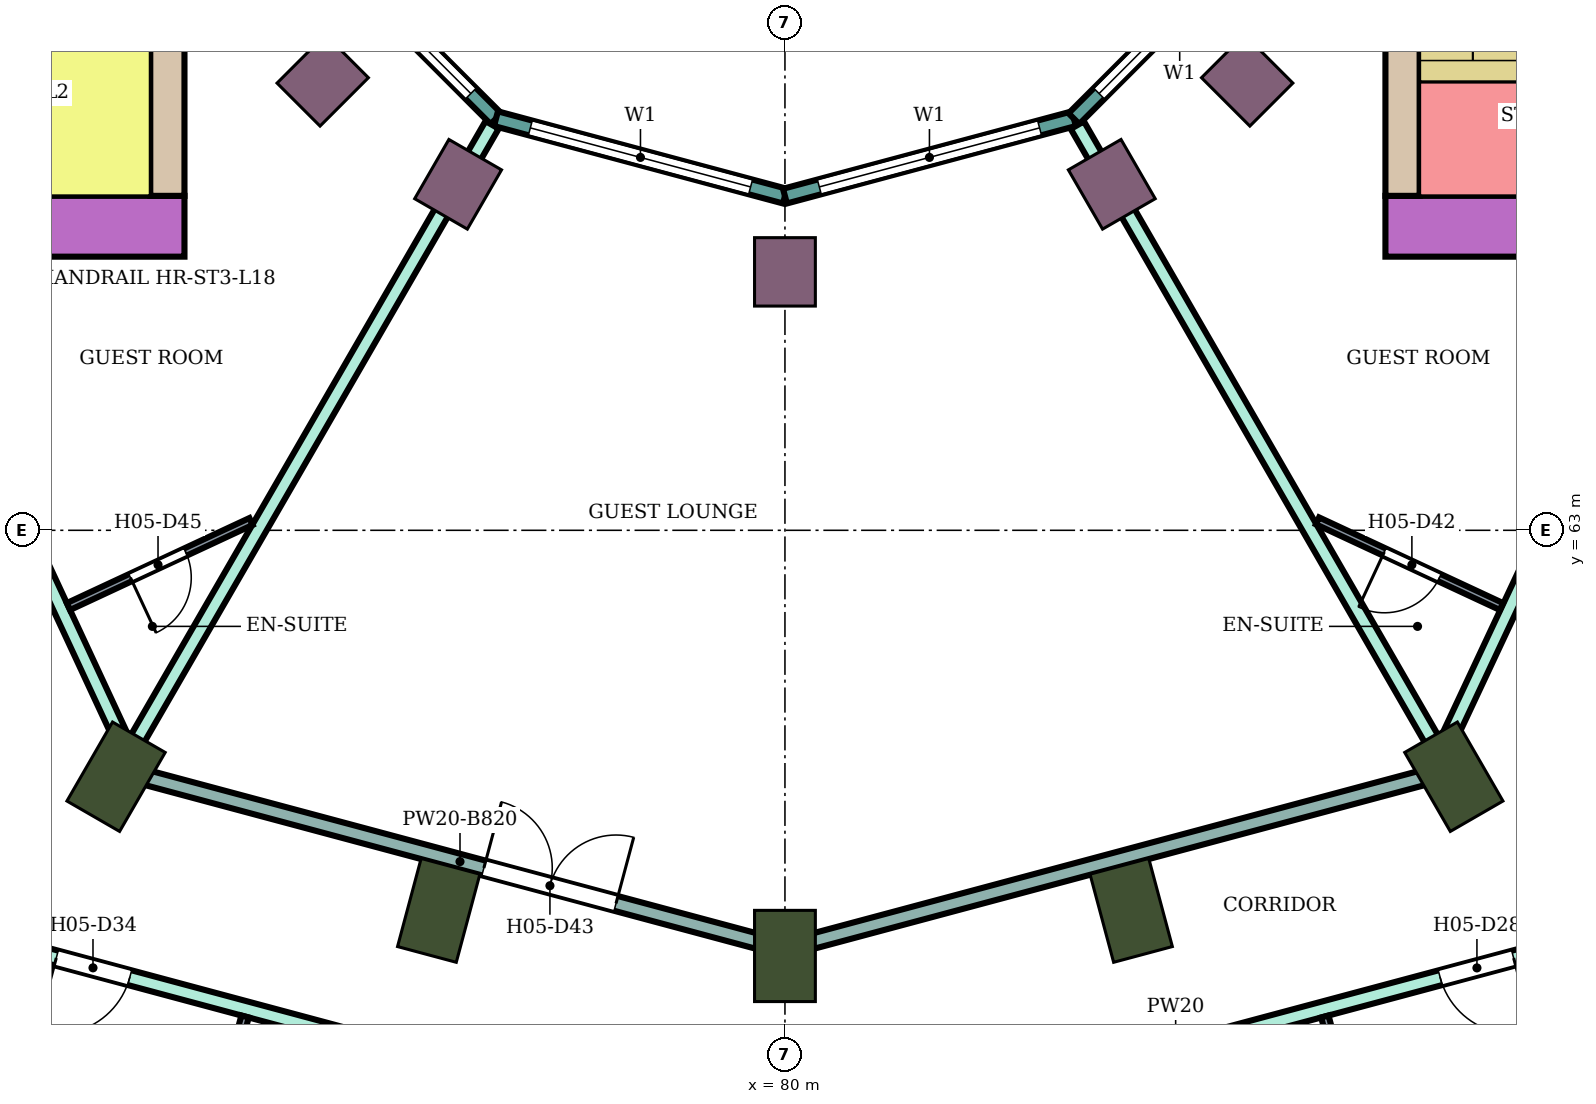
"""IFC4 building model, lengths in metres.
Left out: names, types, materials, properties, quantities, classifications, styles, units other than length and angle.
Written with IfcOpenShell. Run it as: python <this file> out.ifc"""

import sys

from ifc_helpers import new_model, si_unit, direction, frame, frame_2d, origin, origin_2d, place, context, subcontext, project, spatial, rectangle, extrude, element, fill, save


model = new_model("IFC4")
c1 = context("Model", 3, precision=1e-05, world=origin(), true_north=direction((0.0, 1.0)))
c2 = subcontext(c1, "Body", "Model", "MODEL_VIEW")
j1 = project(units=[si_unit("LENGTHUNIT", "METRE"), si_unit("PLANEANGLEUNIT", "RADIAN")], contexts=[c1])
p1 = place(None, origin())
s1 = spatial("IfcSite", under=j1, at=p1, CompositionType="ELEMENT")
p2 = place(p1, origin())
s2 = spatial("IfcBuilding", under=s1, at=p2, CompositionType="ELEMENT")
p3 = place(p2, frame((0.0, 0.0, 82.4)))
s3 = spatial("IfcBuildingStorey", under=s2, at=p3, CompositionType="ELEMENT", Elevation=82.4)
for number, where, z_axis, x_axis in (
    (1, (71.2, 59.758, 0.0), (0.0, 0.0, 1.0), (-0.5, -0.866, 0.0)),
    (2, (75.445, 58.0, 0.0), (0.0, 0.0, 1.0), (-0.259, -0.966, 0.0)),
    (3, (80.0, 57.4, 0.0), (0.0, 0.0, 1.0), (0.0, -1.0, 0.0)),
    (4, (84.555, 58.0, 0.0), (0.0, 0.0, 1.0), (0.259, -0.966, 0.0)),
    (5, (88.8, 59.758, 0.0), (0.0, 0.0, 1.0), (0.5, -0.866, 0.0)),
):
    element("IfcColumn", number, at=place(p3, frame(where, z_axis=z_axis, x_axis=x_axis)), inside=s3, PredefinedType="COLUMN", context=c2, shape_type="SweptSolid", body=[
        extrude(rectangle(XDim=1.2, YDim=0.8, at=origin_2d()), origin(), (0.0, 0.0, 1.0), 3.8),
    ])
for number, where, z_axis, x_axis in (
    (6, (73.919, 68.919, 0.0), (0.0, 0.0, 1.0), (-0.707, -0.707, 0.0)),
    (7, (75.7, 67.552, 0.0), (0.0, 0.0, 1.0), (-0.5, -0.866, 0.0)),
    (8, (80.0, 66.4, 0.0), (0.0, 0.0, 1.0), (0.0, -1.0, 0.0)),
    (9, (84.3, 67.552, 0.0), (0.0, 0.0, 1.0), (0.5, -0.866, 0.0)),
    (10, (86.081, 68.919, 0.0), (0.0, 0.0, 1.0), (0.707, -0.707, 0.0)),
):
    element("IfcColumn", number, at=place(p3, frame(where, z_axis=z_axis, x_axis=x_axis)), inside=s3, PredefinedType="COLUMN", context=c2, shape_type="SweptSolid", body=[
        extrude(rectangle(XDim=0.9, YDim=0.8, at=origin_2d()), origin(), (0.0, 0.0, 1.0), 3.8),
    ])
p4 = place(p3, frame((87.9, 67.0, 0.0), z_axis=(0.0, 0.0, 1.0), x_axis=(1.0, 0.0, 0.0)))
e11 = element("IfcWall", 11, at=p4, inside=s3, PredefinedType="SHEAR", context=c2, shape_type="SweptSolid", body=[
    extrude(rectangle(XDim=14.7, YDim=0.8, at=frame_2d((7.35, 0.0))), origin(), (0.0, 0.0, 1.0), 3.48),
])
p5 = place(p4, frame((4.2, 0.0, 0.0)))
e12 = element("IfcOpeningElement", 12, at=p5, cuts=e11, PredefinedType="OPENING", context=c2, shape_type="SweptSolid", body=[
    extrude(rectangle(XDim=2.4, YDim=2.4, at=frame_2d((1.2, 1.2))), frame((0.0, 0.41, 0.0), z_axis=(0.0, -1.0, 0.0), x_axis=(1.0, 0.0, 0.0)), (0.0, 0.0, 1.0), 0.82),
])
p6 = place(p3, frame((88.125, 67.4, 0.0), z_axis=(0.0, 0.0, 1.0), x_axis=(0.0, 1.0, 0.0)))
e13 = element("IfcWall", 13, at=p6, inside=s3, PredefinedType="SHEAR", context=c2, shape_type="SweptSolid", body=[
    extrude(rectangle(XDim=7.6, YDim=0.45, at=frame_2d((3.8, 0.0))), origin(), (0.0, 0.0, 1.0), 3.48),
])
p7 = place(p3, frame((72.1, 67.0, 0.0), z_axis=(0.0, 0.0, 1.0), x_axis=(-1.0, 0.0, 0.0)))
e14 = element("IfcWall", 14, at=p7, inside=s3, PredefinedType="SHEAR", context=c2, shape_type="SweptSolid", body=[
    extrude(rectangle(XDim=14.7, YDim=0.8, at=frame_2d((7.35, 0.0))), origin(), (0.0, 0.0, 1.0), 3.48),
])
p8 = place(p7, frame((4.2, 0.0, 0.0)))
e15 = element("IfcOpeningElement", 15, at=p8, cuts=e14, PredefinedType="OPENING", context=c2, shape_type="SweptSolid", body=[
    extrude(rectangle(XDim=2.4, YDim=2.4, at=frame_2d((1.2, 1.2))), frame((0.0, 0.41, 0.0), z_axis=(0.0, -1.0, 0.0), x_axis=(1.0, 0.0, 0.0)), (0.0, 0.0, 1.0), 0.82),
])
p9 = place(p3, frame((71.875, 75.0, 0.0), z_axis=(0.0, 0.0, 1.0), x_axis=(0.0, -1.0, 0.0)))
e16 = element("IfcWall", 16, at=p9, inside=s3, PredefinedType="SHEAR", context=c2, shape_type="SweptSolid", body=[
    extrude(rectangle(XDim=7.6, YDim=0.45, at=frame_2d((3.8, 0.0))), origin(), (0.0, 0.0, 1.0), 3.48),
])
p10 = place(p3, frame((73.415, 71.198, 0.0), z_axis=(0.0, 0.0, 1.0), x_axis=(0.707106781187, -0.707106781187, 0.0)))
e17 = element("IfcWall", 17, at=p10, inside=s3, PredefinedType="NOTDEFINED", context=c2, shape_type="SweptSolid", body=[
    extrude(rectangle(XDim=3.936, YDim=0.2, at=frame_2d((1.968, 0.0))), origin(), (0.0, 0.0, 1.0), 3.8),
])
p11 = place(p10, frame((0.468, 0.0, 0.9)))
e18 = element("IfcOpeningElement", 18, at=p11, cuts=e17, PredefinedType="OPENING", context=c2, shape_type="SweptSolid", body=[
    extrude(rectangle(XDim=3.0, YDim=2.3, at=frame_2d((1.5, 1.15))), frame((0.0, 0.11, 0.0), z_axis=(0.0, -1.0, 0.0), x_axis=(1.0, 0.0, 0.0)), (0.0, 0.0, 1.0), 0.22),
])
p12 = place(p3, frame((76.198, 68.415, 0.0), z_axis=(0.0, 0.0, 1.0), x_axis=(0.965933654434, -0.258789828301, 0.0)))
e19 = element("IfcWall", 19, at=p12, inside=s3, PredefinedType="NOTDEFINED", context=c2, shape_type="SweptSolid", body=[
    extrude(rectangle(XDim=3.936, YDim=0.2, at=frame_2d((1.968, 0.0))), origin(), (0.0, 0.0, 1.0), 3.8),
])
p13 = place(p12, frame((0.468, 0.0, 0.9)))
e20 = element("IfcOpeningElement", 20, at=p13, cuts=e19, PredefinedType="OPENING", context=c2, shape_type="SweptSolid", body=[
    extrude(rectangle(XDim=3.0, YDim=2.3, at=frame_2d((1.5, 1.15))), frame((0.0, 0.11, 0.0), z_axis=(0.0, -1.0, 0.0), x_axis=(1.0, 0.0, 0.0)), (0.0, 0.0, 1.0), 0.22),
])
p14 = place(p3, frame((80.0, 67.396, 0.0), z_axis=(0.0, 0.0, 1.0), x_axis=(0.965933654434, 0.258789828301, 0.0)))
e21 = element("IfcWall", 21, at=p14, inside=s3, PredefinedType="NOTDEFINED", context=c2, shape_type="SweptSolid", body=[
    extrude(rectangle(XDim=3.936, YDim=0.2, at=frame_2d((1.968, 0.0))), origin(), (0.0, 0.0, 1.0), 3.8),
])
p15 = place(p14, frame((0.468, 0.0, 0.9)))
e22 = element("IfcOpeningElement", 22, at=p15, cuts=e21, PredefinedType="OPENING", context=c2, shape_type="SweptSolid", body=[
    extrude(rectangle(XDim=3.0, YDim=2.3, at=frame_2d((1.5, 1.15))), frame((0.0, 0.11, 0.0), z_axis=(0.0, -1.0, 0.0), x_axis=(1.0, 0.0, 0.0)), (0.0, 0.0, 1.0), 0.22),
])
p16 = place(p3, frame((83.802, 68.415, 0.0), z_axis=(0.0, 0.0, 1.0), x_axis=(0.707106781187, 0.707106781187, 0.0)))
e23 = element("IfcWall", 23, at=p16, inside=s3, PredefinedType="NOTDEFINED", context=c2, shape_type="SweptSolid", body=[
    extrude(rectangle(XDim=3.936, YDim=0.2, at=frame_2d((1.968, 0.0))), origin(), (0.0, 0.0, 1.0), 3.8),
])
p17 = place(p16, frame((0.468, 0.0, 0.9)))
e24 = element("IfcOpeningElement", 24, at=p17, cuts=e23, PredefinedType="OPENING", context=c2, shape_type="SweptSolid", body=[
    extrude(rectangle(XDim=3.0, YDim=2.3, at=frame_2d((1.5, 1.15))), frame((0.0, 0.11, 0.0), z_axis=(0.0, -1.0, 0.0), x_axis=(1.0, 0.0, 0.0)), (0.0, 0.0, 1.0), 0.22),
])
p18 = place(p3, frame((68.321, 66.6, 0.0), z_axis=(0.0, 0.0, 1.0), x_axis=(0.421914092414, -0.906635813666, 0.0)))
e25 = element("IfcWall", 25, at=p18, inside=s3, PredefinedType="PARTITIONING", context=c2, shape_type="SweptSolid", body=[
    extrude(rectangle(XDim=7.459, YDim=0.2, at=frame_2d((3.73, 0.0))), origin(), (0.0, 0.0, 1.0), 3.35),
])
p19 = place(p18, frame((0.7, 0.0, 0.0)))
e26 = element("IfcOpeningElement", 26, at=p19, cuts=e25, PredefinedType="OPENING", context=c2, shape_type="SweptSolid", body=[
    extrude(rectangle(XDim=1.0, YDim=2.1, at=frame_2d((0.5, 1.05))), frame((0.0, 0.11, 0.0), z_axis=(0.0, -1.0, 0.0), x_axis=(1.0, 0.0, 0.0)), (0.0, 0.0, 1.0), 0.22),
])
p20 = place(p3, frame((69.652, 57.578, 0.0), z_axis=(0.0, 0.0, 1.0), x_axis=(0.965857425723, -0.259074184695, 0.0)))
e27 = element("IfcWall", 27, at=p20, inside=s3, PredefinedType="PARTITIONING", context=c2, shape_type="SweptSolid", body=[
    extrude(rectangle(XDim=10.623, YDim=0.2, at=frame_2d((5.312, 0.0))), origin(), (0.0, 0.0, 1.0), 3.35),
])
p21 = place(p20, frame((9.163, 0.0, 0.0)))
e28 = element("IfcOpeningElement", 28, at=p21, cuts=e27, PredefinedType="OPENING", context=c2, shape_type="SweptSolid", body=[
    extrude(rectangle(XDim=1.0, YDim=2.1, at=frame_2d((0.5, 1.05))), frame((0.0, 0.11, 0.0), z_axis=(0.0, -1.0, 0.0), x_axis=(1.0, 0.0, 0.0)), (0.0, 0.0, 1.0), 0.22),
])
p22 = place(p20, frame((0.788, 0.0, 0.0)))
e29 = element("IfcOpeningElement", 29, at=p22, cuts=e27, PredefinedType="OPENING", context=c2, shape_type="SweptSolid", body=[
    extrude(rectangle(XDim=1.0, YDim=2.1, at=frame_2d((0.5, 1.05))), frame((0.0, 0.11, 0.0), z_axis=(0.0, -1.0, 0.0), x_axis=(1.0, 0.0, 0.0)), (0.0, 0.0, 1.0), 0.22),
])
p23 = place(p3, frame((71.459, 60.218, 0.0), z_axis=(0.0, 0.0, 1.0), x_axis=(0.500232027118, 0.865891401416, 0.0)))
e30 = element("IfcWall", 30, at=p23, inside=s3, PredefinedType="PARTITIONING", context=c2, shape_type="SweptSolid", body=[
    extrude(rectangle(XDim=9.372, YDim=0.2, at=frame_2d((4.686, 0.0))), origin(), (0.0, 0.0, 1.0), 3.35),
])
p24 = place(p3, frame((71.498, 59.774, 0.0), z_axis=(0.0, 0.0, 1.0), x_axis=(0.965911938046, -0.258870871168, 0.0)))
e31 = element("IfcWall", 31, at=p24, inside=s3, PredefinedType="PARTITIONING", context=c2, shape_type="SweptSolid", body=[
    extrude(rectangle(XDim=8.752, YDim=0.2, at=frame_2d((4.376, 0.0))), origin(), (0.0, 0.0, 1.0), 2.98),
])
p25 = place(p24, frame((4.701, 0.0, 0.0)))
e32 = element("IfcOpeningElement", 32, at=p25, cuts=e31, PredefinedType="OPENING", context=c2, shape_type="SweptSolid", body=[
    extrude(rectangle(XDim=1.8, YDim=2.1, at=frame_2d((0.9, 1.05))), frame((0.0, 0.11, 0.0), z_axis=(0.0, -1.0, 0.0), x_axis=(1.0, 0.0, 0.0)), (0.0, 0.0, 1.0), 0.22),
])
p26 = place(p3, frame((80.0, 54.805, 0.0), z_axis=(0.0, 0.0, 1.0), x_axis=(0.965962177934, 0.258683340788, 0.0)))
e33 = element("IfcWall", 33, at=p26, inside=s3, PredefinedType="PARTITIONING", context=c2, shape_type="SweptSolid", body=[
    extrude(rectangle(XDim=10.643, YDim=0.2, at=frame_2d((5.322, 0.0))), origin(), (0.0, 0.0, 1.0), 3.35),
])
p27 = place(p26, frame((8.925, 0.0, 0.0)))
e34 = element("IfcOpeningElement", 34, at=p27, cuts=e33, PredefinedType="OPENING", context=c2, shape_type="SweptSolid", body=[
    extrude(rectangle(XDim=1.0, YDim=2.1, at=frame_2d((0.5, 1.05))), frame((0.0, 0.11, 0.0), z_axis=(0.0, -1.0, 0.0), x_axis=(1.0, 0.0, 0.0)), (0.0, 0.0, 1.0), 0.22),
])
p28 = place(p26, frame((0.55, 0.0, 0.0)))
e35 = element("IfcOpeningElement", 35, at=p28, cuts=e33, PredefinedType="OPENING", context=c2, shape_type="SweptSolid", body=[
    extrude(rectangle(XDim=1.0, YDim=2.1, at=frame_2d((0.5, 1.05))), frame((0.0, 0.11, 0.0), z_axis=(0.0, -1.0, 0.0), x_axis=(1.0, 0.0, 0.0)), (0.0, 0.0, 1.0), 0.22),
])
p29 = place(p3, frame((80.0, 57.496, 0.0), z_axis=(0.0, 0.0, 1.0), x_axis=(0.96592471314, 0.258823199396, 0.0)))
e36 = element("IfcWall", 36, at=p29, inside=s3, PredefinedType="PARTITIONING", context=c2, shape_type="SweptSolid", body=[
    extrude(rectangle(XDim=8.732, YDim=0.2, at=frame_2d((4.366, 0.0))), origin(), (0.0, 0.0, 1.0), 2.98),
])
p30 = place(p3, frame((83.846, 68.33, 0.0), z_axis=(0.0, 0.0, 1.0), x_axis=(0.499822319857, -0.866127963163, 0.0)))
e37 = element("IfcWall", 37, at=p30, inside=s3, PredefinedType="PARTITIONING", context=c2, shape_type="SweptSolid", body=[
    extrude(rectangle(XDim=9.382, YDim=0.2, at=frame_2d((4.691, 0.0))), origin(), (0.0, 0.0, 1.0), 3.35),
])
p31 = place(p3, frame((88.501, 59.775, 0.0), z_axis=(0.0, 0.0, 1.0), x_axis=(0.424700525505, 0.905333896215, 0.0)))
e38 = element("IfcWall", 38, at=p31, inside=s3, PredefinedType="PARTITIONING", context=c2, shape_type="SweptSolid", body=[
    extrude(rectangle(XDim=7.53, YDim=0.2, at=frame_2d((3.765, 0.0))), origin(), (0.0, 0.0, 1.0), 3.35),
])
p32 = place(p31, frame((5.83, 0.0, 0.0)))
e39 = element("IfcOpeningElement", 39, at=p32, cuts=e38, PredefinedType="OPENING", context=c2, shape_type="SweptSolid", body=[
    extrude(rectangle(XDim=1.0, YDim=2.1, at=frame_2d((0.5, 1.05))), frame((0.0, 0.11, 0.0), z_axis=(0.0, -1.0, 0.0), x_axis=(1.0, 0.0, 0.0)), (0.0, 0.0, 1.0), 0.22),
])
p33 = place(p3, frame((70.574, 61.997, 0.0), z_axis=(0.0, 0.0, 1.0), x_axis=(0.906503026865, 0.422199315826, 0.0)))
e40 = element("IfcWall", 40, at=p33, inside=s3, PredefinedType="PARTITIONING", context=c2, shape_type="SweptSolid", body=[
    extrude(rectangle(XDim=2.65, YDim=0.1, at=frame_2d((1.325, 0.0))), origin(), (0.0, 0.0, 1.0), 3.35),
])
p34 = place(p33, frame((0.9, 0.0, 0.0)))
e41 = element("IfcOpeningElement", 41, at=p34, cuts=e40, PredefinedType="OPENING", context=c2, shape_type="SweptSolid", body=[
    extrude(rectangle(XDim=0.8, YDim=2.1, at=frame_2d((0.4, 1.05))), frame((0.0, 0.06, 0.0), z_axis=(0.0, -1.0, 0.0), x_axis=(1.0, 0.0, 0.0)), (0.0, 0.0, 1.0), 0.12),
])
p35 = place(p3, frame((72.211, 54.044, 0.0), z_axis=(0.0, 0.0, 1.0), x_axis=(0.258866552082, 0.96591309558, 0.0)))
e42 = element("IfcWall", 42, at=p35, inside=s3, PredefinedType="PARTITIONING", context=c2, shape_type="SweptSolid", body=[
    extrude(rectangle(XDim=2.65, YDim=0.1, at=frame_2d((1.325, 0.0))), origin(), (0.0, 0.0, 1.0), 3.35),
])
p36 = place(p35, frame((0.95, 0.0, 0.0)))
e43 = element("IfcOpeningElement", 43, at=p36, cuts=e42, PredefinedType="OPENING", context=c2, shape_type="SweptSolid", body=[
    extrude(rectangle(XDim=0.8, YDim=2.1, at=frame_2d((0.4, 1.05))), frame((0.0, 0.06, 0.0), z_axis=(0.0, -1.0, 0.0), x_axis=(1.0, 0.0, 0.0)), (0.0, 0.0, 1.0), 0.12),
])
p37 = place(p3, frame((87.006, 63.124, 0.0), z_axis=(0.0, 0.0, 1.0), x_axis=(0.906535604863, -0.422129360642, 0.0)))
e44 = element("IfcWall", 44, at=p37, inside=s3, PredefinedType="PARTITIONING", context=c2, shape_type="SweptSolid", body=[
    extrude(rectangle(XDim=2.67, YDim=0.1, at=frame_2d((1.335, 0.0))), origin(), (0.0, 0.0, 1.0), 3.35),
])
p38 = place(p37, frame((0.97, 0.0, 0.0)))
e45 = element("IfcOpeningElement", 45, at=p38, cuts=e44, PredefinedType="OPENING", context=c2, shape_type="SweptSolid", body=[
    extrude(rectangle(XDim=0.8, YDim=2.1, at=frame_2d((0.4, 1.05))), frame((0.0, 0.06, 0.0), z_axis=(0.0, -1.0, 0.0), x_axis=(1.0, 0.0, 0.0)), (0.0, 0.0, 1.0), 0.12),
])
p39 = place(p3, frame((87.103, 56.604, 0.0), z_axis=(0.0, 0.0, 1.0), x_axis=(0.258883730688, -0.965908491517, 0.0)))
e46 = element("IfcWall", 46, at=p39, inside=s3, PredefinedType="PARTITIONING", context=c2, shape_type="SweptSolid", body=[
    extrude(rectangle(XDim=2.7, YDim=0.1, at=frame_2d((1.35, 0.0))), origin(), (0.0, 0.0, 1.0), 3.35),
])
p40 = place(p39, frame((0.9, 0.0, 0.0)))
e47 = element("IfcOpeningElement", 47, at=p40, cuts=e46, PredefinedType="OPENING", context=c2, shape_type="SweptSolid", body=[
    extrude(rectangle(XDim=0.8, YDim=2.1, at=frame_2d((0.4, 1.05))), frame((0.0, 0.06, 0.0), z_axis=(0.0, -1.0, 0.0), x_axis=(1.0, 0.0, 0.0)), (0.0, 0.0, 1.0), 0.12),
])
p41 = place(p11, origin())
e48 = element("IfcWindow", 48, at=p41, inside=s3, PartitioningType="SINGLE_PANEL", PredefinedType="WINDOW", context=c2, shape_type="SweptSolid", body=[
    extrude(rectangle(XDim=3.0, YDim=2.3, at=frame_2d((1.5, 1.15))), frame((0.0, 0.03, 0.0), z_axis=(0.0, -1.0, 0.0), x_axis=(1.0, 0.0, 0.0)), (0.0, 0.0, 1.0), 0.06),
])
fill(e18, e48)
p42 = place(p13, origin())
e49 = element("IfcWindow", 49, at=p42, inside=s3, PartitioningType="SINGLE_PANEL", PredefinedType="WINDOW", context=c2, shape_type="SweptSolid", body=[
    extrude(rectangle(XDim=3.0, YDim=2.3, at=frame_2d((1.5, 1.15))), frame((0.0, 0.03, 0.0), z_axis=(0.0, -1.0, 0.0), x_axis=(1.0, 0.0, 0.0)), (0.0, 0.0, 1.0), 0.06),
])
fill(e20, e49)
p43 = place(p15, origin())
e50 = element("IfcWindow", 50, at=p43, inside=s3, PartitioningType="SINGLE_PANEL", PredefinedType="WINDOW", context=c2, shape_type="SweptSolid", body=[
    extrude(rectangle(XDim=3.0, YDim=2.3, at=frame_2d((1.5, 1.15))), frame((0.0, 0.03, 0.0), z_axis=(0.0, -1.0, 0.0), x_axis=(1.0, 0.0, 0.0)), (0.0, 0.0, 1.0), 0.06),
])
fill(e22, e50)
p44 = place(p17, origin())
e51 = element("IfcWindow", 51, at=p44, inside=s3, PartitioningType="SINGLE_PANEL", PredefinedType="WINDOW", context=c2, shape_type="SweptSolid", body=[
    extrude(rectangle(XDim=3.0, YDim=2.3, at=frame_2d((1.5, 1.15))), frame((0.0, 0.03, 0.0), z_axis=(0.0, -1.0, 0.0), x_axis=(1.0, 0.0, 0.0)), (0.0, 0.0, 1.0), 0.06),
])
fill(e24, e51)
p45 = place(p27, frame((1.0, 0.0, 0.0), z_axis=(0.0, 0.0, 1.0), x_axis=(-1.0, 0.0, 0.0)))
e52 = element("IfcDoor", 52, at=p45, inside=s3, OperationType="SINGLE_SWING_LEFT", PredefinedType="DOOR", context=c2, shape_type="SweptSolid", body=[
    extrude(rectangle(XDim=1.0, YDim=2.1, at=frame_2d((0.5, 1.05))), frame((0.0, 0.025, 0.0), z_axis=(0.0, -1.0, 0.0), x_axis=(1.0, 0.0, 0.0)), (0.0, 0.0, 1.0), 0.05),
])
fill(e34, e52)
p46 = place(p22, frame((1.0, 0.0, 0.0), z_axis=(0.0, 0.0, 1.0), x_axis=(-1.0, 0.0, 0.0)))
e53 = element("IfcDoor", 53, at=p46, inside=s3, OperationType="SINGLE_SWING_RIGHT", PredefinedType="DOOR", context=c2, shape_type="SweptSolid", body=[
    extrude(rectangle(XDim=1.0, YDim=2.1, at=frame_2d((0.5, 1.05))), frame((0.0, 0.025, 0.0), z_axis=(0.0, -1.0, 0.0), x_axis=(1.0, 0.0, 0.0)), (0.0, 0.0, 1.0), 0.05),
])
fill(e29, e53)
p47 = place(p38, frame((0.8, 0.0, 0.0), z_axis=(0.0, 0.0, 1.0), x_axis=(-1.0, 0.0, 0.0)))
e54 = element("IfcDoor", 54, at=p47, inside=s3, OperationType="SINGLE_SWING_RIGHT", PredefinedType="DOOR", context=c2, shape_type="SweptSolid", body=[
    extrude(rectangle(XDim=0.8, YDim=2.1, at=frame_2d((0.4, 1.05))), frame((0.0, 0.025, 0.0), z_axis=(0.0, -1.0, 0.0), x_axis=(1.0, 0.0, 0.0)), (0.0, 0.0, 1.0), 0.05),
])
fill(e45, e54)
p48 = place(p25, origin())
e55 = element("IfcDoor", 55, at=p48, inside=s3, OperationType="DOUBLE_DOOR_SINGLE_SWING", PredefinedType="DOOR", context=c2, shape_type="SweptSolid", body=[
    extrude(rectangle(XDim=1.8, YDim=2.1, at=frame_2d((0.9, 1.05))), frame((0.0, 0.025, 0.0), z_axis=(0.0, -1.0, 0.0), x_axis=(1.0, 0.0, 0.0)), (0.0, 0.0, 1.0), 0.05),
])
fill(e32, e55)
p49 = place(p34, frame((0.8, 0.0, 0.0), z_axis=(0.0, 0.0, 1.0), x_axis=(-1.0, 0.0, 0.0)))
e56 = element("IfcDoor", 56, at=p49, inside=s3, OperationType="SINGLE_SWING_RIGHT", PredefinedType="DOOR", context=c2, shape_type="SweptSolid", body=[
    extrude(rectangle(XDim=0.8, YDim=2.1, at=frame_2d((0.4, 1.05))), frame((0.0, 0.025, 0.0), z_axis=(0.0, -1.0, 0.0), x_axis=(1.0, 0.0, 0.0)), (0.0, 0.0, 1.0), 0.05),
])
fill(e41, e56)
save(model, sys.argv[1])
